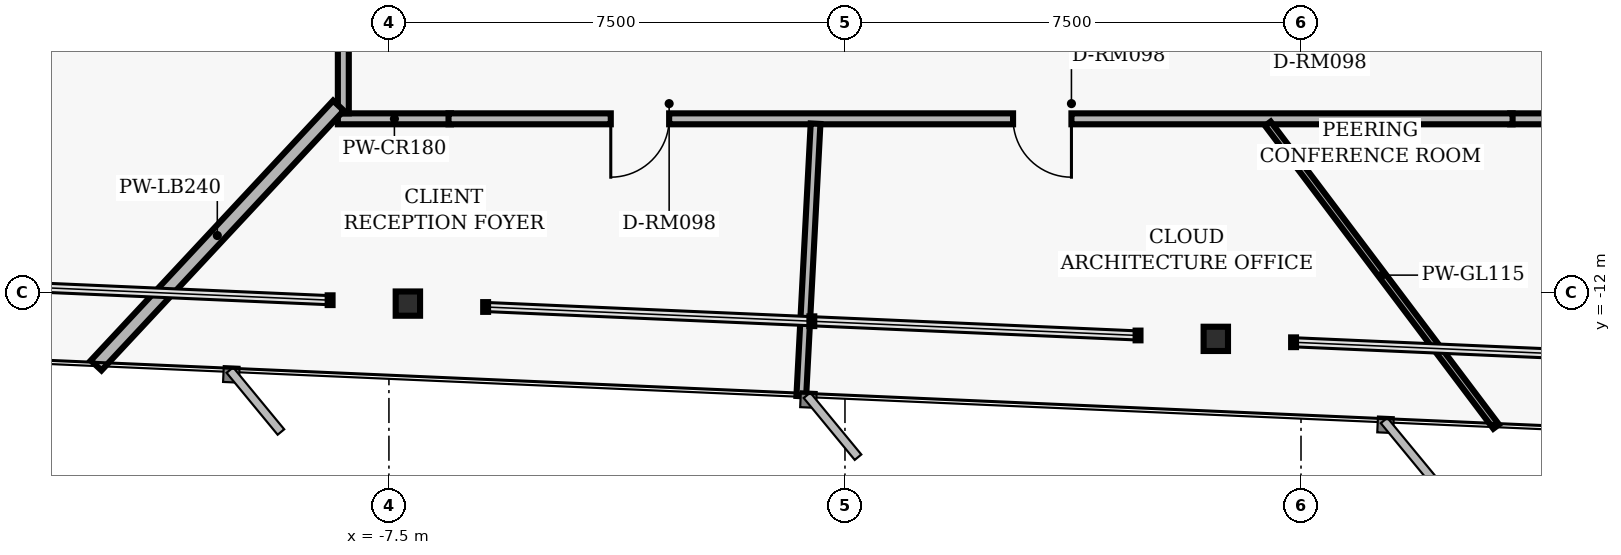
"""IFC4 building model, lengths in metres.
Left out: names, types, materials, properties, quantities, classifications, styles, units other than length and angle.
Written with IfcOpenShell. Run it as: python <this file> out.ifc"""

import sys

from ifc_helpers import new_model, si_unit, direction, frame, frame_2d, origin, origin_2d, place, context, subcontext, project, spatial, rectangle, i_section, extrude, element, fill, save


model = new_model("IFC4")
c1 = context("Model", 3, precision=1e-05, world=origin(), true_north=direction((0.0, 1.0)))
c2 = subcontext(c1, "Body", "Model", "MODEL_VIEW")
j1 = project(units=[si_unit("LENGTHUNIT", "METRE"), si_unit("PLANEANGLEUNIT", "RADIAN")], contexts=[c1])
p1 = place(None, origin())
s1 = spatial("IfcSite", under=j1, at=p1, CompositionType="ELEMENT")
p2 = place(p1, origin())
s2 = spatial("IfcBuilding", under=s1, at=p2, CompositionType="ELEMENT")
p3 = place(p2, frame((0.0, 0.0, 144.16)))
s3 = spatial("IfcBuildingStorey", under=s2, at=p3, CompositionType="ELEMENT", Elevation=144.16)
for number, where, z_axis, x_axis in (
    (1, (-7.188, -12.189, 0.0), (0.0, 0.0, 1.0), (1.0, 0.0, 0.0)),
    (2, (6.099, -12.769, 0.0), (0.0, 0.0, 1.0), (1.0, 0.0, 0.0)),
):
    element("IfcColumn", number, at=place(p3, frame(where, z_axis=z_axis, x_axis=x_axis)), inside=s3, PredefinedType="COLUMN", context=c2, shape_type="SweptSolid", body=[
        extrude(i_section(OverallWidth=0.401, OverallDepth=0.399, WebThickness=0.025, FlangeThickness=0.04, FilletRadius=0.018, at=origin_2d()), origin(), (0.0, 0.0, 1.0), 3.04),
    ])
p4 = place(p3, frame((-6.48, -9.15, 0.0), z_axis=(0.0, 0.0, 1.0), x_axis=(-1.0, 0.0, 0.0)))
e3 = element("IfcWall", 3, at=p4, inside=s3, PredefinedType="PARTITIONING", context=c2, shape_type="SweptSolid", body=[
    extrude(rectangle(XDim=1.86, YDim=0.18, at=frame_2d((0.93, 0.0))), origin(), (0.0, 0.0, 1.0), 2.16),
])
p5 = place(p3, frame((-8.25, -9.06, 0.0), z_axis=(0.0, 0.0, 1.0), x_axis=(0.0, 1.0, 0.0)))
e4 = element("IfcWall", 4, at=p5, inside=s3, PredefinedType="PARTITIONING", context=c2, shape_type="SweptSolid", body=[
    extrude(rectangle(XDim=1.88, YDim=0.18, at=frame_2d((0.94, 0.0))), origin(), (0.0, 0.0, 1.0), 2.593),
])
p6 = place(p3, frame((14.69, -9.15, 0.0), z_axis=(0.0, 0.0, 1.0), x_axis=(-1.0, 0.0, 0.0)))
e5 = element("IfcWall", 5, at=p6, inside=s3, PredefinedType="PARTITIONING", context=c2, shape_type="SweptSolid", body=[
    extrude(rectangle(XDim=3.75, YDim=0.18, at=frame_2d((1.875, 0.0))), origin(), (0.0, 0.0, 1.0), 2.16),
])
p7 = place(p3, frame((10.98, -9.15, 0.0), z_axis=(0.0, 0.0, 1.0), x_axis=(-1.0, 0.0, 0.0)))
e6 = element("IfcWall", 6, at=p7, inside=s3, PredefinedType="PARTITIONING", context=c2, shape_type="SweptSolid", body=[
    extrude(rectangle(XDim=17.5, YDim=0.18, at=frame_2d((8.75, 0.0))), origin(), (0.0, 0.0, 1.0), 2.16),
])
p8 = place(p7, frame((13.872, 0.0, 0.0)))
e7 = element("IfcOpeningElement", 7, at=p8, cuts=e6, PredefinedType="OPENING", context=c2, shape_type="SweptSolid", body=[
    extrude(rectangle(XDim=0.96, YDim=2.02, at=frame_2d((0.48, 1.01))), frame((0.0, 0.1, 0.0), z_axis=(0.0, -1.0, 0.0), x_axis=(1.0, 0.0, 0.0)), (0.0, 0.0, 1.0), 0.2),
])
p9 = place(p7, frame((7.256, 0.0, 0.0)))
e8 = element("IfcOpeningElement", 8, at=p9, cuts=e6, PredefinedType="OPENING", context=c2, shape_type="SweptSolid", body=[
    extrude(rectangle(XDim=0.96, YDim=2.02, at=frame_2d((0.48, 1.01))), frame((0.0, 0.1, 0.0), z_axis=(0.0, -1.0, 0.0), x_axis=(1.0, 0.0, 0.0)), (0.0, 0.0, 1.0), 0.2),
])
p10 = place(p3, frame((-8.33, -8.933, 0.0), z_axis=(0.0, 0.0, 1.0), x_axis=(-0.682004079658, -0.731348367968, 0.0)))
e9 = element("IfcWall", 9, at=p10, inside=s3, PredefinedType="PARTITIONING", context=c2, shape_type="SweptSolid", body=[
    extrude(rectangle(XDim=5.843, YDim=0.24, at=frame_2d((2.922, 0.0))), origin(), (0.0, 0.0, 1.0), 2.593),
])
p11 = place(p3, frame((-0.484, -9.23, 0.0), z_axis=(0.0, 0.0, 1.0), x_axis=(-0.052321895389, -0.998630271553, 0.0)))
e10 = element("IfcWall", 10, at=p11, inside=s3, PredefinedType="PARTITIONING", context=c2, shape_type="SweptSolid", body=[
    extrude(rectangle(XDim=4.489, YDim=0.16, at=frame_2d((2.244, 0.0))), origin(), (0.0, 0.0, 1.0), 2.593),
])
p12 = place(p3, frame((6.955, -9.23, 0.0), z_axis=(0.0, 0.0, 1.0), x_axis=(0.60180827309, -0.79864059654, 0.0)))
e11 = element("IfcWall", 11, at=p12, inside=s3, PredefinedType="MOVABLE", context=c2, shape_type="SweptSolid", body=[
    extrude(rectangle(XDim=6.238, YDim=0.115, at=frame_2d((3.119, 0.0))), origin(), (0.0, 0.0, 1.0), 2.593),
])
p13 = place(p8, origin())
e12 = element("IfcDoor", 12, at=p13, inside=s3, OperationType="SINGLE_SWING_RIGHT", PredefinedType="DOOR", context=c2, shape_type="SweptSolid", body=[
    extrude(rectangle(XDim=0.96, YDim=2.02, at=frame_2d((0.48, 1.01))), frame((0.0, 0.025, 0.0), z_axis=(0.0, -1.0, 0.0), x_axis=(1.0, 0.0, 0.0)), (0.0, 0.0, 1.0), 0.05),
])
fill(e7, e12)
p14 = place(p9, origin())
e13 = element("IfcDoor", 13, at=p14, inside=s3, OperationType="SINGLE_SWING_LEFT", PredefinedType="DOOR", context=c2, shape_type="SweptSolid", body=[
    extrude(rectangle(XDim=0.96, YDim=2.02, at=frame_2d((0.48, 1.01))), frame((0.0, 0.025, 0.0), z_axis=(0.0, -1.0, 0.0), x_axis=(1.0, 0.0, 0.0)), (0.0, 0.0, 1.0), 0.05),
])
fill(e8, e13)
save(model, sys.argv[1])
